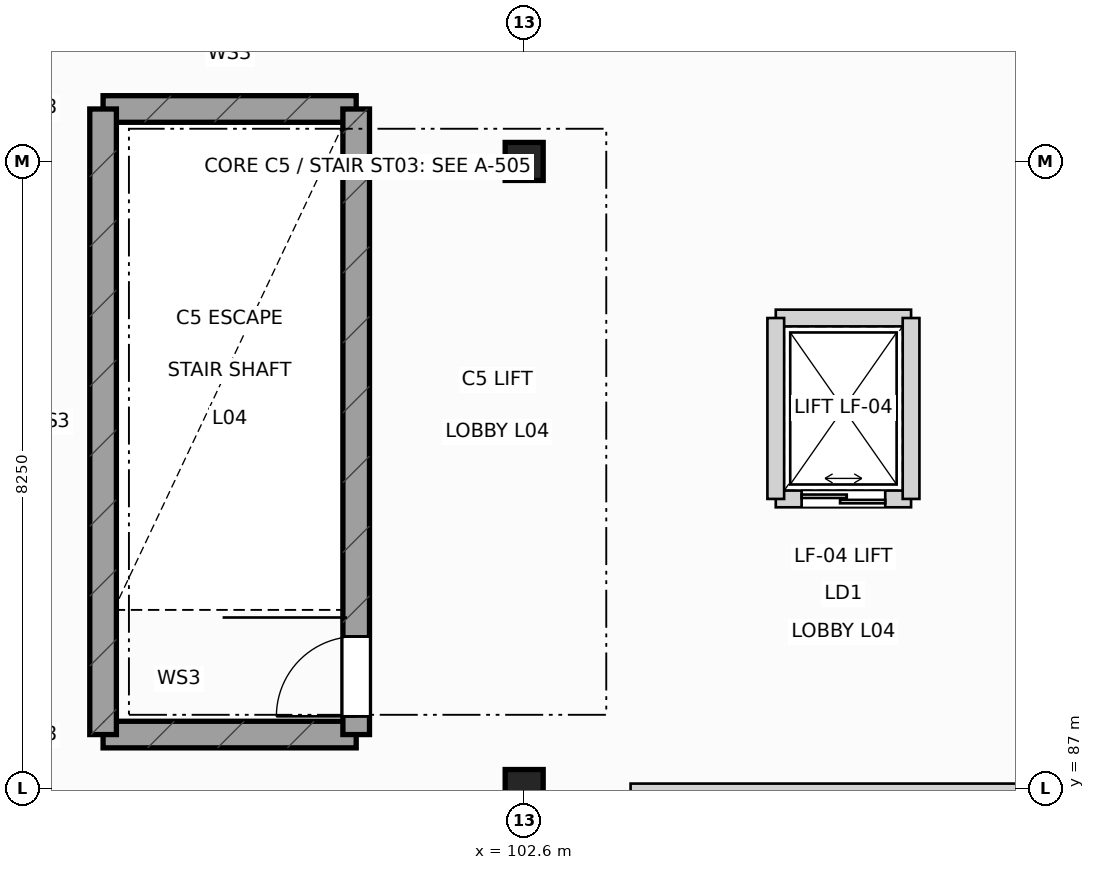
"""IFC4 building model, lengths in metres.
Left out: names, types, materials, properties, quantities, classifications, styles, units other than length and angle.
Written with IfcOpenShell. Run it as: python <this file> out.ifc"""

import sys

from ifc_helpers import new_model, si_unit, direction, frame, frame_2d, origin, origin_2d, place, context, subcontext, project, spatial, rectangle, extrude, element, fill, save


model = new_model("IFC4")
c1 = context("Model", 3, precision=1e-05, world=origin(), true_north=direction((0.0, 1.0)))
c2 = subcontext(c1, "Body", "Model", "MODEL_VIEW")
j1 = project(units=[si_unit("LENGTHUNIT", "METRE"), si_unit("PLANEANGLEUNIT", "RADIAN")], contexts=[c1])
p1 = place(None, origin())
s1 = spatial("IfcSite", under=j1, at=p1, CompositionType="ELEMENT")
p2 = place(p1, origin())
s2 = spatial("IfcBuilding", under=s1, at=p2, CompositionType="ELEMENT")
p3 = place(p2, frame((0.0, 0.0, 21.6)))
s3 = spatial("IfcBuildingStorey", under=s2, at=p3, CompositionType="ELEMENT", Elevation=21.6)
for number, where, z_axis, x_axis in (
    (1, (102.6, 87.0, 0.0), (0.0, 0.0, 1.0), (1.0, 0.0, 0.0)),
    (2, (102.6, 95.25, 0.0), (0.0, 0.0, 1.0), (1.0, 0.0, 0.0)),
):
    element("IfcColumn", number, at=place(p3, frame(where, z_axis=z_axis, x_axis=x_axis)), inside=s3, PredefinedType="COLUMN", context=c2, shape_type="SweptSolid", body=[
        extrude(rectangle(XDim=0.5, YDim=0.5, at=origin_2d()), origin(), (0.0, 0.0, 1.0), 4.8),
    ])
for number, where, z_axis, x_axis in (
    (3, (97.06, 87.71, 0.0), (0.0, 0.0, 1.0), (1.0, 0.0, 0.0)),
    (4, (97.06, 95.94, 0.0), (0.0, 0.0, 1.0), (1.0, 0.0, 0.0)),
):
    element("IfcWall", number, at=place(p3, frame(where, z_axis=z_axis, x_axis=x_axis)), inside=s3, PredefinedType="SHEAR", context=c2, shape_type="SweptSolid", body=[
        extrude(rectangle(XDim=3.33, YDim=0.35, at=frame_2d((1.665, 0.0))), origin(), (0.0, 0.0, 1.0), 4.54),
    ])
p4 = place(p3, frame((97.06, 87.71, 0.0), z_axis=(0.0, 0.0, 1.0), x_axis=(0.0, 1.0, 0.0)))
e5 = element("IfcWall", 5, at=p4, inside=s3, PredefinedType="SHEAR", context=c2, shape_type="SweptSolid", body=[
    extrude(rectangle(XDim=8.23, YDim=0.35, at=frame_2d((4.115, 0.0))), origin(), (0.0, 0.0, 1.0), 4.54),
])
p5 = place(p3, frame((100.39, 87.71, 0.0), z_axis=(0.0, 0.0, 1.0), x_axis=(0.0, 1.0, 0.0)))
e6 = element("IfcWall", 6, at=p5, inside=s3, PredefinedType="SHEAR", context=c2, shape_type="SweptSolid", body=[
    extrude(rectangle(XDim=8.23, YDim=0.35, at=frame_2d((4.115, 0.0))), origin(), (0.0, 0.0, 1.0), 4.54),
])
p6 = place(p5, frame((0.24, 0.0, 0.0)))
e7 = element("IfcOpeningElement", 7, at=p6, cuts=e6, PredefinedType="OPENING", context=c2, shape_type="SweptSolid", body=[
    extrude(rectangle(XDim=1.05, YDim=2.18, at=frame_2d((0.525, 1.09))), frame((0.0, 0.185, 0.0), z_axis=(0.0, -1.0, 0.0), x_axis=(1.0, 0.0, 0.0)), (0.0, 0.0, 1.0), 0.37),
])
p7 = place(p3, frame((105.91, 90.81, 0.0), z_axis=(0.0, 0.0, 1.0), x_axis=(1.0, 0.0, 0.0)))
e8 = element("IfcWall", 8, at=p7, inside=s3, PredefinedType="PARTITIONING", context=c2, shape_type="SweptSolid", body=[
    extrude(rectangle(XDim=1.78, YDim=0.22, at=frame_2d((0.89, 0.0))), origin(), (0.0, 0.0, 1.0), 4.505),
])
p8 = place(p7, frame((0.34, 0.0, 0.0)))
e9 = element("IfcOpeningElement", 9, at=p8, cuts=e8, PredefinedType="OPENING", context=c2, shape_type="SweptSolid", body=[
    extrude(rectangle(XDim=1.1, YDim=2.18, at=frame_2d((0.55, 1.09))), frame((0.0, 0.12, 0.0), z_axis=(0.0, -1.0, 0.0), x_axis=(1.0, 0.0, 0.0)), (0.0, 0.0, 1.0), 0.24),
])
p9 = place(p3, frame((105.91, 93.19, 0.0), z_axis=(0.0, 0.0, 1.0), x_axis=(1.0, 0.0, 0.0)))
e10 = element("IfcWall", 10, at=p9, inside=s3, PredefinedType="PARTITIONING", context=c2, shape_type="SweptSolid", body=[
    extrude(rectangle(XDim=1.78, YDim=0.22, at=frame_2d((0.89, 0.0))), origin(), (0.0, 0.0, 1.0), 4.505),
])
for number, where, z_axis, x_axis in (
    (11, (105.91, 90.81, 0.0), (0.0, 0.0, 1.0), (0.0, 1.0, 0.0)),
    (12, (107.69, 90.81, 0.0), (0.0, 0.0, 1.0), (0.0, 1.0, 0.0)),
):
    element("IfcWall", number, at=place(p3, frame(where, z_axis=z_axis, x_axis=x_axis)), inside=s3, PredefinedType="PARTITIONING", context=c2, shape_type="SweptSolid", body=[
        extrude(rectangle(XDim=2.38, YDim=0.22, at=frame_2d((1.19, 0.0))), origin(), (0.0, 0.0, 1.0), 4.505),
    ])
p10 = place(p3, frame((104.0, 87.0, 0.0), z_axis=(0.0, 0.0, 1.0), x_axis=(1.0, 0.0, 0.0)))
e13 = element("IfcWall", 13, at=p10, inside=s3, PredefinedType="PARTITIONING", context=c2, shape_type="SweptSolid", body=[
    extrude(rectangle(XDim=20.0, YDim=0.13, at=frame_2d((10.0, 0.0))), origin(), (0.0, 0.0, 1.0), 4.165),
])
p11 = place(p10, frame((9.525, 0.0, 0.0)))
e14 = element("IfcOpeningElement", 14, at=p11, cuts=e13, PredefinedType="OPENING", context=c2, shape_type="SweptSolid", body=[
    extrude(rectangle(XDim=0.95, YDim=2.1, at=frame_2d((0.475, 1.05))), frame((0.0, 0.075, 0.0), z_axis=(0.0, -1.0, 0.0), x_axis=(1.0, 0.0, 0.0)), (0.0, 0.0, 1.0), 0.15),
])
p12 = place(p6, origin())
e15 = element("IfcDoor", 15, at=p12, inside=s3, OperationType="SINGLE_SWING_LEFT", PredefinedType="DOOR", context=c2, shape_type="SweptSolid", body=[
    extrude(rectangle(XDim=1.05, YDim=2.18, at=frame_2d((0.525, 1.09))), frame((0.0, 0.025, 0.0), z_axis=(0.0, -1.0, 0.0), x_axis=(1.0, 0.0, 0.0)), (0.0, 0.0, 1.0), 0.05),
])
fill(e7, e15)
p13 = place(p8, origin())
e16 = element("IfcDoor", 16, at=p13, inside=s3, OperationType="DOUBLE_DOOR_SLIDING", PredefinedType="DOOR", context=c2, shape_type="SweptSolid", body=[
    extrude(rectangle(XDim=1.1, YDim=2.18, at=frame_2d((0.55, 1.09))), frame((0.0, 0.025, 0.0), z_axis=(0.0, -1.0, 0.0), x_axis=(1.0, 0.0, 0.0)), (0.0, 0.0, 1.0), 0.05),
])
fill(e9, e16)
save(model, sys.argv[1])
